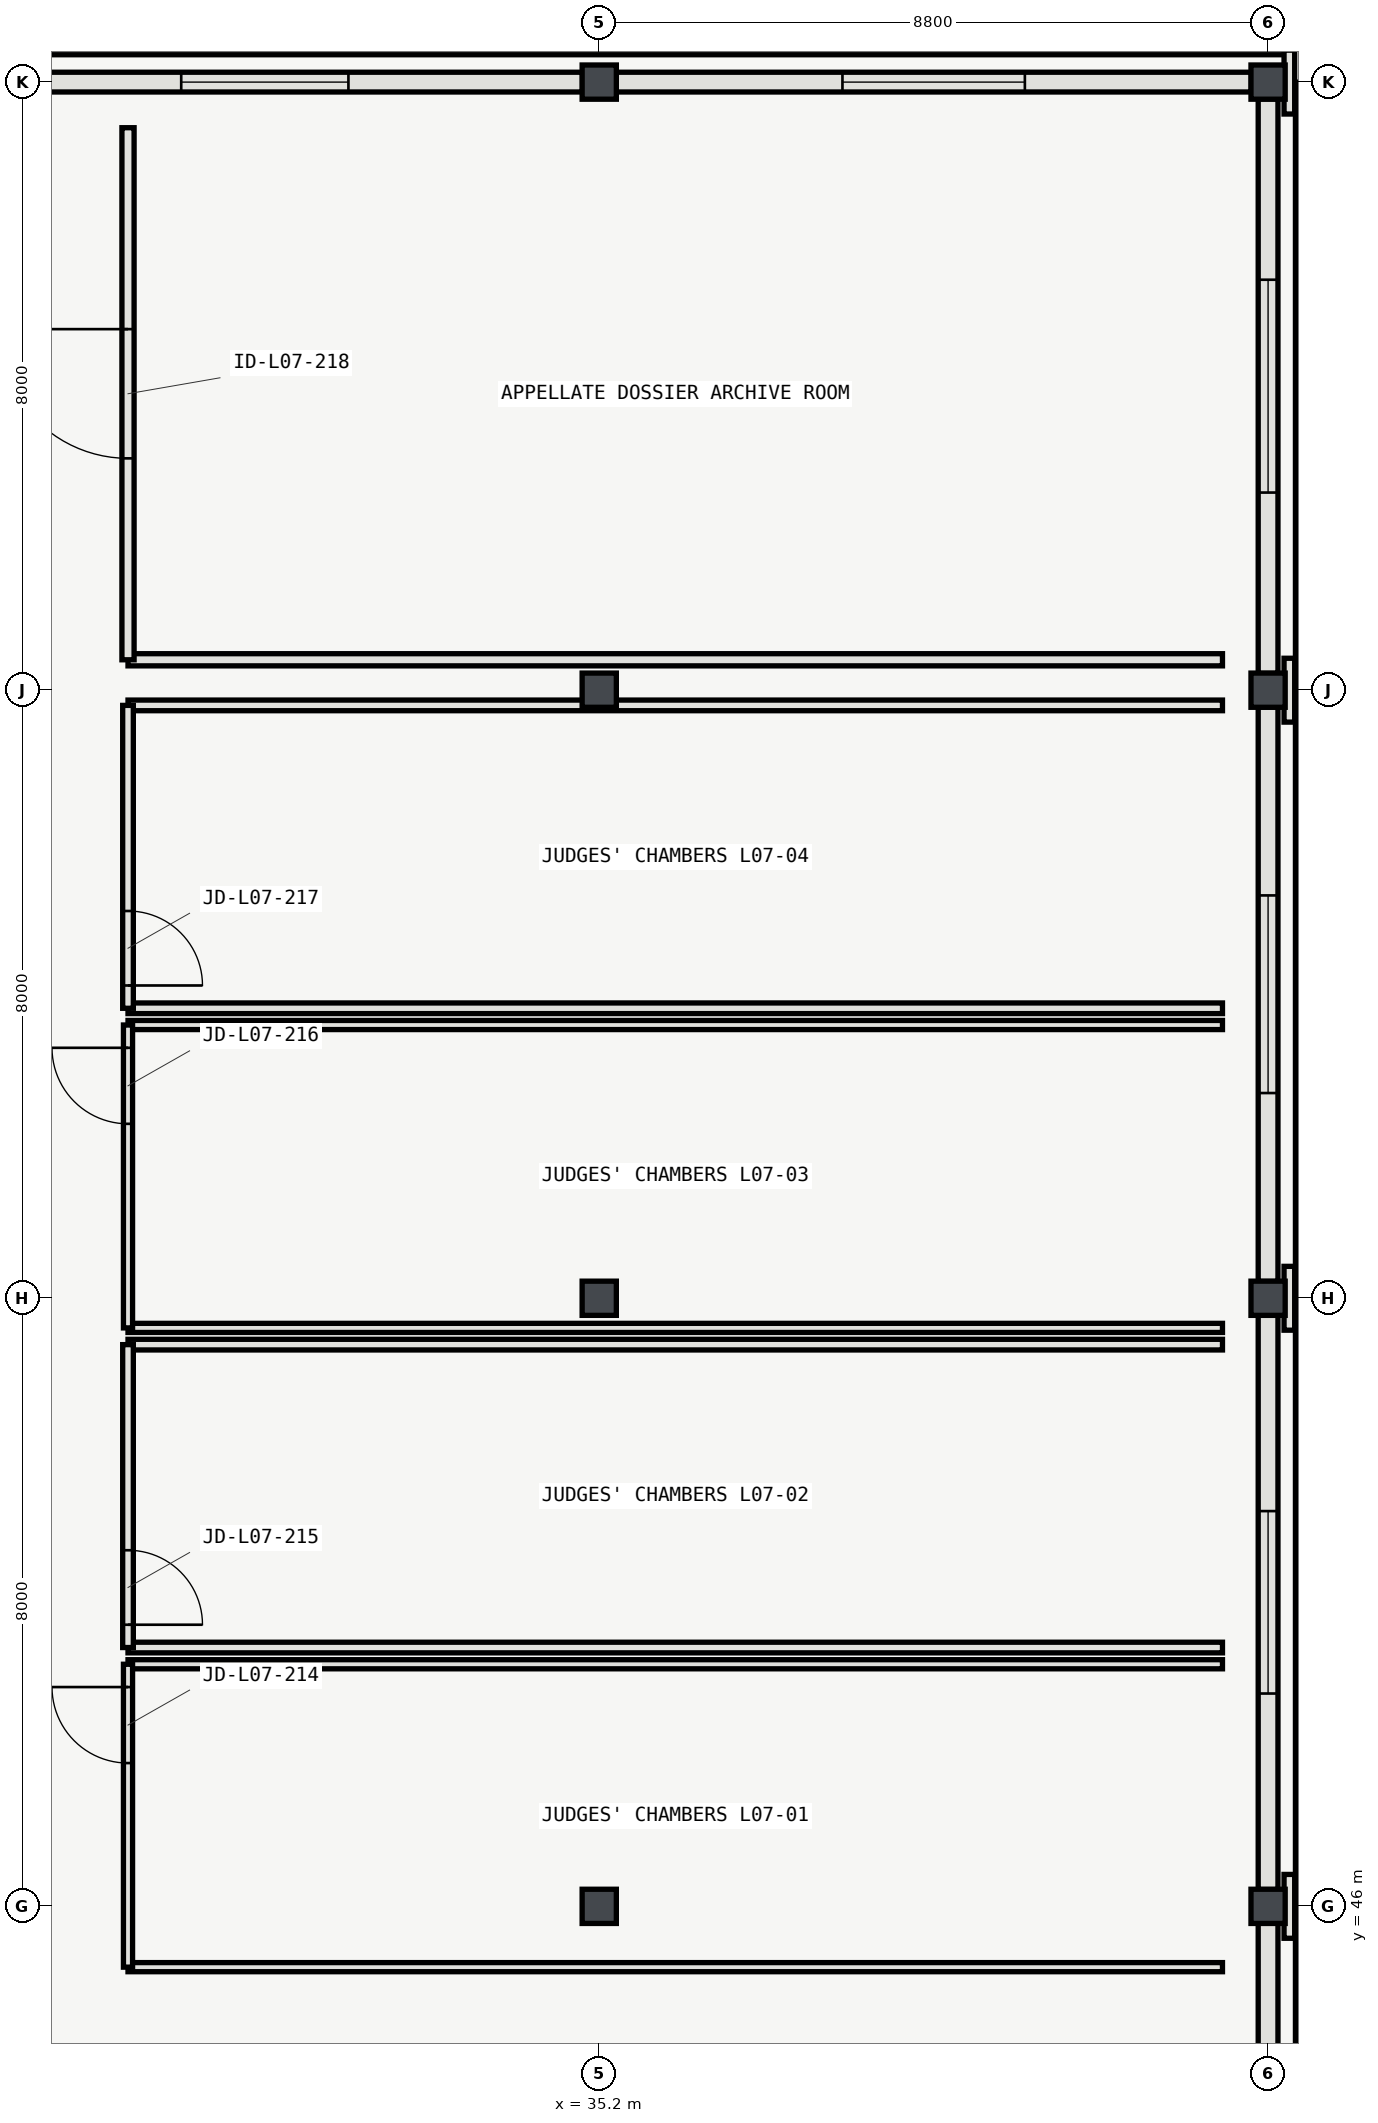
"""IFC4 building model, lengths in metres.
Left out: names, types, materials, properties, quantities, classifications, styles, units other than length and angle.
Written with IfcOpenShell. Run it as: python <this file> out.ifc"""

import sys

from ifc_helpers import new_model, si_unit, direction, frame, frame_2d, origin, origin_2d, place, context, subcontext, project, spatial, rectangle, hollow_rectangle, extrude, element, fill, save


model = new_model("IFC4")
c1 = context("Model", 3, precision=1e-05, world=origin(), true_north=direction((0.0, 1.0)))
c2 = subcontext(c1, "Body", "Model", "MODEL_VIEW")
j1 = project(units=[si_unit("LENGTHUNIT", "METRE"), si_unit("PLANEANGLEUNIT", "RADIAN")], contexts=[c1])
p1 = place(None, origin())
s1 = spatial("IfcSite", under=j1, at=p1, CompositionType="ELEMENT")
p2 = place(p1, origin())
s2 = spatial("IfcBuilding", under=s1, at=p2, CompositionType="ELEMENT")
p3 = place(p2, frame((0.0, 0.0, 33.0)))
s3 = spatial("IfcBuildingStorey", under=s2, at=p3, CompositionType="ELEMENT", Elevation=33.0)
for number, where, z_axis, x_axis in (
    (1, (35.2, 46.0, 0.0), (0.0, 0.0, 1.0), (1.0, 0.0, 0.0)),
    (2, (35.2, 54.0, 0.0), (0.0, 0.0, 1.0), (1.0, 0.0, 0.0)),
    (3, (35.2, 62.0, 0.0), (0.0, 0.0, 1.0), (1.0, 0.0, 0.0)),
    (4, (35.2, 70.0, 0.0), (0.0, 0.0, 1.0), (1.0, 0.0, 0.0)),
    (5, (44.0, 46.0, 0.0), (0.0, 0.0, 1.0), (1.0, 0.0, 0.0)),
    (6, (44.0, 54.0, 0.0), (0.0, 0.0, 1.0), (1.0, 0.0, 0.0)),
    (7, (44.0, 62.0, 0.0), (0.0, 0.0, 1.0), (1.0, 0.0, 0.0)),
    (8, (44.0, 70.0, 0.0), (0.0, 0.0, 1.0), (1.0, 0.0, 0.0)),
):
    element("IfcColumn", number, at=place(p3, frame(where, z_axis=z_axis, x_axis=x_axis)), inside=s3, PredefinedType="COLUMN", context=c2, shape_type="SweptSolid", body=[
        extrude(hollow_rectangle(XDim=0.45, YDim=0.45, WallThickness=0.018, InnerFilletRadius=0.018, OuterFilletRadius=0.036, at=origin_2d()), origin(), (0.0, 0.0, 1.0), 4.2),
    ])
p4 = place(p3, frame((34.979, 70.0, 0.0), z_axis=(0.0, 0.0, 1.0), x_axis=(-1.0, 0.0, 0.0)))
e9 = element("IfcWall", 9, at=p4, inside=s3, PredefinedType="SOLIDWALL", context=c2, shape_type="SweptSolid", body=[
    extrude(rectangle(XDim=8.283, YDim=0.26, at=frame_2d((4.142, 0.0))), origin(), (0.0, 0.0, 1.0), 3.483),
])
p5 = place(p4, frame((3.079, 0.0, 0.95)))
e10 = element("IfcOpeningElement", 10, at=p5, cuts=e9, PredefinedType="OPENING", context=c2, shape_type="SweptSolid", body=[
    extrude(rectangle(XDim=2.2, YDim=1.8, at=frame_2d((1.1, 0.9))), frame((0.0, 0.14, 0.0), z_axis=(0.0, -1.0, 0.0), x_axis=(1.0, 0.0, 0.0)), (0.0, 0.0, 1.0), 0.28),
])
p6 = place(p3, frame((43.779, 70.0, 0.0), z_axis=(0.0, 0.0, 1.0), x_axis=(-1.0, 0.0, 0.0)))
e11 = element("IfcWall", 11, at=p6, inside=s3, PredefinedType="SOLIDWALL", context=c2, shape_type="SweptSolid", body=[
    extrude(rectangle(XDim=8.358, YDim=0.26, at=frame_2d((4.179, 0.0))), origin(), (0.0, 0.0, 1.0), 3.483),
])
p7 = place(p6, frame((2.979, 0.0, 0.95)))
e12 = element("IfcOpeningElement", 12, at=p7, cuts=e11, PredefinedType="OPENING", context=c2, shape_type="SweptSolid", body=[
    extrude(rectangle(XDim=2.4, YDim=1.8, at=frame_2d((1.2, 0.9))), frame((0.0, 0.14, 0.0), z_axis=(0.0, -1.0, 0.0), x_axis=(1.0, 0.0, 0.0)), (0.0, 0.0, 1.0), 0.28),
])
p8 = place(p3, frame((44.0, 38.221, 0.0), z_axis=(0.0, 0.0, 1.0), x_axis=(0.0, 1.0, 0.0)))
e13 = element("IfcWall", 13, at=p8, inside=s3, PredefinedType="SOLIDWALL", context=c2, shape_type="SweptSolid", body=[
    extrude(rectangle(XDim=7.558, YDim=0.26, at=frame_2d((3.779, 0.0))), origin(), (0.0, 0.0, 1.0), 3.483),
])
p9 = place(p8, frame((2.679, 0.0, 0.95)))
e14 = element("IfcOpeningElement", 14, at=p9, cuts=e13, PredefinedType="OPENING", context=c2, shape_type="SweptSolid", body=[
    extrude(rectangle(XDim=2.2, YDim=2.1, at=frame_2d((1.1, 1.05))), frame((0.0, 0.14, 0.0), z_axis=(0.0, -1.0, 0.0), x_axis=(1.0, 0.0, 0.0)), (0.0, 0.0, 1.0), 0.28),
])
p10 = place(p3, frame((44.0, 46.221, 0.0), z_axis=(0.0, 0.0, 1.0), x_axis=(0.0, 1.0, 0.0)))
e15 = element("IfcWall", 15, at=p10, inside=s3, PredefinedType="SOLIDWALL", context=c2, shape_type="SweptSolid", body=[
    extrude(rectangle(XDim=7.558, YDim=0.26, at=frame_2d((3.779, 0.0))), origin(), (0.0, 0.0, 1.0), 3.483),
])
p11 = place(p10, frame((2.579, 0.0, 0.95)))
e16 = element("IfcOpeningElement", 16, at=p11, cuts=e15, PredefinedType="OPENING", context=c2, shape_type="SweptSolid", body=[
    extrude(rectangle(XDim=2.4, YDim=2.1, at=frame_2d((1.2, 1.05))), frame((0.0, 0.14, 0.0), z_axis=(0.0, -1.0, 0.0), x_axis=(1.0, 0.0, 0.0)), (0.0, 0.0, 1.0), 0.28),
])
p12 = place(p3, frame((44.0, 54.221, 0.0), z_axis=(0.0, 0.0, 1.0), x_axis=(0.0, 1.0, 0.0)))
e17 = element("IfcWall", 17, at=p12, inside=s3, PredefinedType="SOLIDWALL", context=c2, shape_type="SweptSolid", body=[
    extrude(rectangle(XDim=7.558, YDim=0.26, at=frame_2d((3.779, 0.0))), origin(), (0.0, 0.0, 1.0), 3.483),
])
p13 = place(p12, frame((2.479, 0.0, 0.95)))
e18 = element("IfcOpeningElement", 18, at=p13, cuts=e17, PredefinedType="OPENING", context=c2, shape_type="SweptSolid", body=[
    extrude(rectangle(XDim=2.6, YDim=2.1, at=frame_2d((1.3, 1.05))), frame((0.0, 0.14, 0.0), z_axis=(0.0, -1.0, 0.0), x_axis=(1.0, 0.0, 0.0)), (0.0, 0.0, 1.0), 0.28),
])
p14 = place(p3, frame((44.0, 62.221, 0.0), z_axis=(0.0, 0.0, 1.0), x_axis=(0.0, 1.0, 0.0)))
e19 = element("IfcWall", 19, at=p14, inside=s3, PredefinedType="SOLIDWALL", context=c2, shape_type="SweptSolid", body=[
    extrude(rectangle(XDim=7.558, YDim=0.26, at=frame_2d((3.779, 0.0))), origin(), (0.0, 0.0, 1.0), 3.483),
])
p15 = place(p14, frame((2.379, 0.0, 0.95)))
e20 = element("IfcOpeningElement", 20, at=p15, cuts=e19, PredefinedType="OPENING", context=c2, shape_type="SweptSolid", body=[
    extrude(rectangle(XDim=2.8, YDim=2.1, at=frame_2d((1.4, 1.05))), frame((0.0, 0.14, 0.0), z_axis=(0.0, -1.0, 0.0), x_axis=(1.0, 0.0, 0.0)), (0.0, 0.0, 1.0), 0.28),
])
p16 = place(p3, frame((44.44, 30.0, 0.0), z_axis=(0.0, 0.0, 1.0), x_axis=(0.0, 1.0, 0.0)))
e21 = element("IfcWall", 21, at=p16, inside=s3, PredefinedType="SOLIDWALL", context=c2, shape_type="SweptSolid", body=[
    extrude(rectangle(XDim=40.0, YDim=0.16, at=frame_2d((20.0, 0.0))), origin(), (0.0, 0.0, 1.0), 0.58),
])
p17 = place(p3, frame((44.34, 70.44, 0.0), z_axis=(0.0, 0.0, 1.0), x_axis=(-1.0, 0.0, 0.0)))
e22 = element("IfcWall", 22, at=p17, inside=s3, PredefinedType="SOLIDWALL", context=c2, shape_type="SweptSolid", body=[
    extrude(rectangle(XDim=44.68, YDim=0.16, at=frame_2d((22.34, 0.0))), origin(), (0.0, 0.0, 1.0), 0.58),
])
for number, where, z_axis, x_axis in (
    (23, (44.28, 45.58, 0.0), (0.0, 0.0, 1.0), (0.0, 1.0, 0.0)),
    (24, (44.28, 53.58, 0.0), (0.0, 0.0, 1.0), (0.0, 1.0, 0.0)),
    (25, (44.28, 61.58, 0.0), (0.0, 0.0, 1.0), (0.0, 1.0, 0.0)),
    (26, (44.28, 69.58, 0.0), (0.0, 0.0, 1.0), (0.0, 1.0, 0.0)),
):
    element("IfcWall", number, at=place(p3, frame(where, z_axis=z_axis, x_axis=x_axis)), inside=s3, PredefinedType="SOLIDWALL", context=c2, shape_type="SweptSolid", body=[
        extrude(rectangle(XDim=0.84, YDim=0.14, at=frame_2d((0.42, 0.0))), origin(), (0.0, 0.0, 1.0), 3.94),
    ])
for number, where, z_axis, x_axis in (
    (27, (29.0, 45.2, 0.0), (0.0, 0.0, 1.0), (1.0, 0.0, 0.0)),
    (28, (43.4, 49.185, 0.0), (0.0, 0.0, 1.0), (-1.0, 0.0, 0.0)),
):
    element("IfcWall", number, at=place(p3, frame(where, z_axis=z_axis, x_axis=x_axis)), inside=s3, PredefinedType="PARTITIONING", context=c2, shape_type="SweptSolid", body=[
        extrude(rectangle(XDim=14.4, YDim=0.12, at=frame_2d((7.2, 0.0))), origin(), (0.0, 0.0, 1.0), 3.92),
    ])
p18 = place(p3, frame((29.0, 49.185, 0.0), z_axis=(0.0, 0.0, 1.0), x_axis=(0.0, -1.0, 0.0)))
e29 = element("IfcWall", 29, at=p18, inside=s3, PredefinedType="PARTITIONING", context=c2, shape_type="SweptSolid", body=[
    extrude(rectangle(XDim=3.985, YDim=0.12, at=frame_2d((1.993, 0.0))), origin(), (0.0, 0.0, 1.0), 3.92),
])
p19 = place(p18, frame((0.3, 0.0, 0.0)))
e30 = element("IfcOpeningElement", 30, at=p19, cuts=e29, PredefinedType="OPENING", context=c2, shape_type="SweptSolid", body=[
    extrude(rectangle(XDim=1.0, YDim=2.15, at=frame_2d((0.5, 1.075))), frame((0.0, 0.07, 0.0), z_axis=(0.0, -1.0, 0.0), x_axis=(1.0, 0.0, 0.0)), (0.0, 0.0, 1.0), 0.14),
])
for number, where, z_axis, x_axis in (
    (31, (29.0, 49.405, 0.0), (0.0, 0.0, 1.0), (1.0, 0.0, 0.0)),
    (32, (43.4, 53.39, 0.0), (0.0, 0.0, 1.0), (-1.0, 0.0, 0.0)),
):
    element("IfcWall", number, at=place(p3, frame(where, z_axis=z_axis, x_axis=x_axis)), inside=s3, PredefinedType="PARTITIONING", context=c2, shape_type="SweptSolid", body=[
        extrude(rectangle(XDim=14.4, YDim=0.14, at=frame_2d((7.2, 0.0))), origin(), (0.0, 0.0, 1.0), 3.92),
    ])
p20 = place(p3, frame((29.0, 53.39, 0.0), z_axis=(0.0, 0.0, 1.0), x_axis=(0.0, -1.0, 0.0)))
e33 = element("IfcWall", 33, at=p20, inside=s3, PredefinedType="PARTITIONING", context=c2, shape_type="SweptSolid", body=[
    extrude(rectangle(XDim=3.985, YDim=0.14, at=frame_2d((1.992, 0.0))), origin(), (0.0, 0.0, 1.0), 3.92),
])
p21 = place(p20, frame((2.705, 0.0, 0.0)))
e34 = element("IfcOpeningElement", 34, at=p21, cuts=e33, PredefinedType="OPENING", context=c2, shape_type="SweptSolid", body=[
    extrude(rectangle(XDim=0.98, YDim=2.15, at=frame_2d((0.49, 1.075))), frame((0.0, 0.08, 0.0), z_axis=(0.0, -1.0, 0.0), x_axis=(1.0, 0.0, 0.0)), (0.0, 0.0, 1.0), 0.16),
])
for number, where, z_axis, x_axis in (
    (35, (29.0, 53.61, 0.0), (0.0, 0.0, 1.0), (1.0, 0.0, 0.0)),
    (36, (43.4, 57.595, 0.0), (0.0, 0.0, 1.0), (-1.0, 0.0, 0.0)),
):
    element("IfcWall", number, at=place(p3, frame(where, z_axis=z_axis, x_axis=x_axis)), inside=s3, PredefinedType="PARTITIONING", context=c2, shape_type="SweptSolid", body=[
        extrude(rectangle(XDim=14.4, YDim=0.12, at=frame_2d((7.2, 0.0))), origin(), (0.0, 0.0, 1.0), 3.92),
    ])
p22 = place(p3, frame((29.0, 57.595, 0.0), z_axis=(0.0, 0.0, 1.0), x_axis=(0.0, -1.0, 0.0)))
e37 = element("IfcWall", 37, at=p22, inside=s3, PredefinedType="PARTITIONING", context=c2, shape_type="SweptSolid", body=[
    extrude(rectangle(XDim=3.985, YDim=0.12, at=frame_2d((1.992, 0.0))), origin(), (0.0, 0.0, 1.0), 3.92),
])
p23 = place(p22, frame((0.3, 0.0, 0.0)))
e38 = element("IfcOpeningElement", 38, at=p23, cuts=e37, PredefinedType="OPENING", context=c2, shape_type="SweptSolid", body=[
    extrude(rectangle(XDim=1.0, YDim=2.2, at=frame_2d((0.5, 1.1))), frame((0.0, 0.07, 0.0), z_axis=(0.0, -1.0, 0.0), x_axis=(1.0, 0.0, 0.0)), (0.0, 0.0, 1.0), 0.14),
])
p24 = place(p3, frame((29.0, 57.815, 0.0), z_axis=(0.0, 0.0, 1.0), x_axis=(1.0, 0.0, 0.0)))
e39 = element("IfcWall", 39, at=p24, inside=s3, PredefinedType="PARTITIONING", context=c2, shape_type="SweptSolid", body=[
    extrude(rectangle(XDim=14.4, YDim=0.14, at=frame_2d((7.2, 0.0))), origin(), (0.0, 0.0, 1.0), 3.92),
])
p25 = place(p3, frame((43.4, 61.8, 0.0), z_axis=(0.0, 0.0, 1.0), x_axis=(-1.0, 0.0, 0.0)))
e40 = element("IfcWall", 40, at=p25, inside=s3, PredefinedType="PARTITIONING", context=c2, shape_type="SweptSolid", body=[
    extrude(rectangle(XDim=14.4, YDim=0.14, at=frame_2d((7.2, 0.0))), origin(), (0.0, 0.0, 1.0), 3.636),
])
p26 = place(p3, frame((29.0, 61.8, 0.0), z_axis=(0.0, 0.0, 1.0), x_axis=(0.0, -1.0, 0.0)))
e41 = element("IfcWall", 41, at=p26, inside=s3, PredefinedType="PARTITIONING", context=c2, shape_type="SweptSolid", body=[
    extrude(rectangle(XDim=3.985, YDim=0.14, at=frame_2d((1.993, 0.0))), origin(), (0.0, 0.0, 1.0), 3.92),
])
p27 = place(p26, frame((2.705, 0.0, 0.0)))
e42 = element("IfcOpeningElement", 42, at=p27, cuts=e41, PredefinedType="OPENING", context=c2, shape_type="SweptSolid", body=[
    extrude(rectangle(XDim=0.98, YDim=2.2, at=frame_2d((0.49, 1.1))), frame((0.0, 0.08, 0.0), z_axis=(0.0, -1.0, 0.0), x_axis=(1.0, 0.0, 0.0)), (0.0, 0.0, 1.0), 0.16),
])
p28 = place(p3, frame((29.0, 62.4, 0.0), z_axis=(0.0, 0.0, 1.0), x_axis=(1.0, 0.0, 0.0)))
e43 = element("IfcWall", 43, at=p28, inside=s3, PredefinedType="PARTITIONING", context=c2, shape_type="SweptSolid", body=[
    extrude(rectangle(XDim=14.4, YDim=0.16, at=frame_2d((7.2, 0.0))), origin(), (0.0, 0.0, 1.0), 3.92),
])
p29 = place(p3, frame((29.0, 69.4, 0.0), z_axis=(0.0, 0.0, 1.0), x_axis=(0.0, -1.0, 0.0)))
e44 = element("IfcWall", 44, at=p29, inside=s3, PredefinedType="PARTITIONING", context=c2, shape_type="SweptSolid", body=[
    extrude(rectangle(XDim=7.0, YDim=0.16, at=frame_2d((3.5, 0.0))), origin(), (0.0, 0.0, 1.0), 3.92),
])
p30 = place(p29, frame((2.65, 0.0, 0.0)))
e45 = element("IfcOpeningElement", 45, at=p30, cuts=e44, PredefinedType="OPENING", context=c2, shape_type="SweptSolid", body=[
    extrude(rectangle(XDim=1.7, YDim=2.3, at=frame_2d((0.85, 1.15))), frame((0.0, 0.09, 0.0), z_axis=(0.0, -1.0, 0.0), x_axis=(1.0, 0.0, 0.0)), (0.0, 0.0, 1.0), 0.18),
])
p31 = place(p5, origin())
e46 = element("IfcWindow", 46, at=p31, inside=s3, PartitioningType="SINGLE_PANEL", PredefinedType="WINDOW", context=c2, shape_type="SweptSolid", body=[
    extrude(rectangle(XDim=2.2, YDim=1.8, at=frame_2d((1.1, 0.9))), frame((0.0, 0.03, 0.0), z_axis=(0.0, -1.0, 0.0), x_axis=(1.0, 0.0, 0.0)), (0.0, 0.0, 1.0), 0.06),
])
fill(e10, e46)
p32 = place(p7, origin())
e47 = element("IfcWindow", 47, at=p32, inside=s3, PartitioningType="SINGLE_PANEL", PredefinedType="WINDOW", context=c2, shape_type="SweptSolid", body=[
    extrude(rectangle(XDim=2.4, YDim=1.8, at=frame_2d((1.2, 0.9))), frame((0.0, 0.03, 0.0), z_axis=(0.0, -1.0, 0.0), x_axis=(1.0, 0.0, 0.0)), (0.0, 0.0, 1.0), 0.06),
])
fill(e12, e47)
p33 = place(p11, origin())
e48 = element("IfcWindow", 48, at=p33, inside=s3, PartitioningType="SINGLE_PANEL", PredefinedType="WINDOW", context=c2, shape_type="SweptSolid", body=[
    extrude(rectangle(XDim=2.4, YDim=2.1, at=frame_2d((1.2, 1.05))), frame((0.0, 0.03, 0.0), z_axis=(0.0, -1.0, 0.0), x_axis=(1.0, 0.0, 0.0)), (0.0, 0.0, 1.0), 0.06),
])
fill(e16, e48)
p34 = place(p13, origin())
e49 = element("IfcWindow", 49, at=p34, inside=s3, PartitioningType="SINGLE_PANEL", PredefinedType="WINDOW", context=c2, shape_type="SweptSolid", body=[
    extrude(rectangle(XDim=2.6, YDim=2.1, at=frame_2d((1.3, 1.05))), frame((0.0, 0.03, 0.0), z_axis=(0.0, -1.0, 0.0), x_axis=(1.0, 0.0, 0.0)), (0.0, 0.0, 1.0), 0.06),
])
fill(e18, e49)
p35 = place(p15, origin())
e50 = element("IfcWindow", 50, at=p35, inside=s3, PartitioningType="SINGLE_PANEL", PredefinedType="WINDOW", context=c2, shape_type="SweptSolid", body=[
    extrude(rectangle(XDim=2.8, YDim=2.1, at=frame_2d((1.4, 1.05))), frame((0.0, 0.03, 0.0), z_axis=(0.0, -1.0, 0.0), x_axis=(1.0, 0.0, 0.0)), (0.0, 0.0, 1.0), 0.06),
])
fill(e20, e50)
p36 = place(p19, origin())
e51 = element("IfcDoor", 51, at=p36, inside=s3, OperationType="SINGLE_SWING_LEFT", PredefinedType="DOOR", context=c2, shape_type="SweptSolid", body=[
    extrude(rectangle(XDim=1.0, YDim=2.15, at=frame_2d((0.5, 1.075))), frame((0.0, 0.025, 0.0), z_axis=(0.0, -1.0, 0.0), x_axis=(1.0, 0.0, 0.0)), (0.0, 0.0, 1.0), 0.05),
])
fill(e30, e51)
p37 = place(p21, origin())
e52 = element("IfcDoor", 52, at=p37, inside=s3, OperationType="SINGLE_SWING_RIGHT", PredefinedType="DOOR", context=c2, shape_type="SweptSolid", body=[
    extrude(rectangle(XDim=0.98, YDim=2.15, at=frame_2d((0.49, 1.075))), frame((0.0, 0.025, 0.0), z_axis=(0.0, -1.0, 0.0), x_axis=(1.0, 0.0, 0.0)), (0.0, 0.0, 1.0), 0.05),
])
fill(e34, e52)
p38 = place(p23, origin())
e53 = element("IfcDoor", 53, at=p38, inside=s3, OperationType="SINGLE_SWING_LEFT", PredefinedType="DOOR", context=c2, shape_type="SweptSolid", body=[
    extrude(rectangle(XDim=1.0, YDim=2.2, at=frame_2d((0.5, 1.1))), frame((0.0, 0.025, 0.0), z_axis=(0.0, -1.0, 0.0), x_axis=(1.0, 0.0, 0.0)), (0.0, 0.0, 1.0), 0.05),
])
fill(e38, e53)
p39 = place(p27, origin())
e54 = element("IfcDoor", 54, at=p39, inside=s3, OperationType="SINGLE_SWING_RIGHT", PredefinedType="DOOR", context=c2, shape_type="SweptSolid", body=[
    extrude(rectangle(XDim=0.98, YDim=2.2, at=frame_2d((0.49, 1.1))), frame((0.0, 0.025, 0.0), z_axis=(0.0, -1.0, 0.0), x_axis=(1.0, 0.0, 0.0)), (0.0, 0.0, 1.0), 0.05),
])
fill(e42, e54)
p40 = place(p30, origin())
e55 = element("IfcDoor", 55, at=p40, inside=s3, OperationType="DOUBLE_DOOR_SINGLE_SWING", PredefinedType="DOOR", context=c2, shape_type="SweptSolid", body=[
    extrude(rectangle(XDim=1.7, YDim=2.3, at=frame_2d((0.85, 1.15))), frame((0.0, 0.025, 0.0), z_axis=(0.0, -1.0, 0.0), x_axis=(1.0, 0.0, 0.0)), (0.0, 0.0, 1.0), 0.05),
])
fill(e45, e55)
save(model, sys.argv[1])
